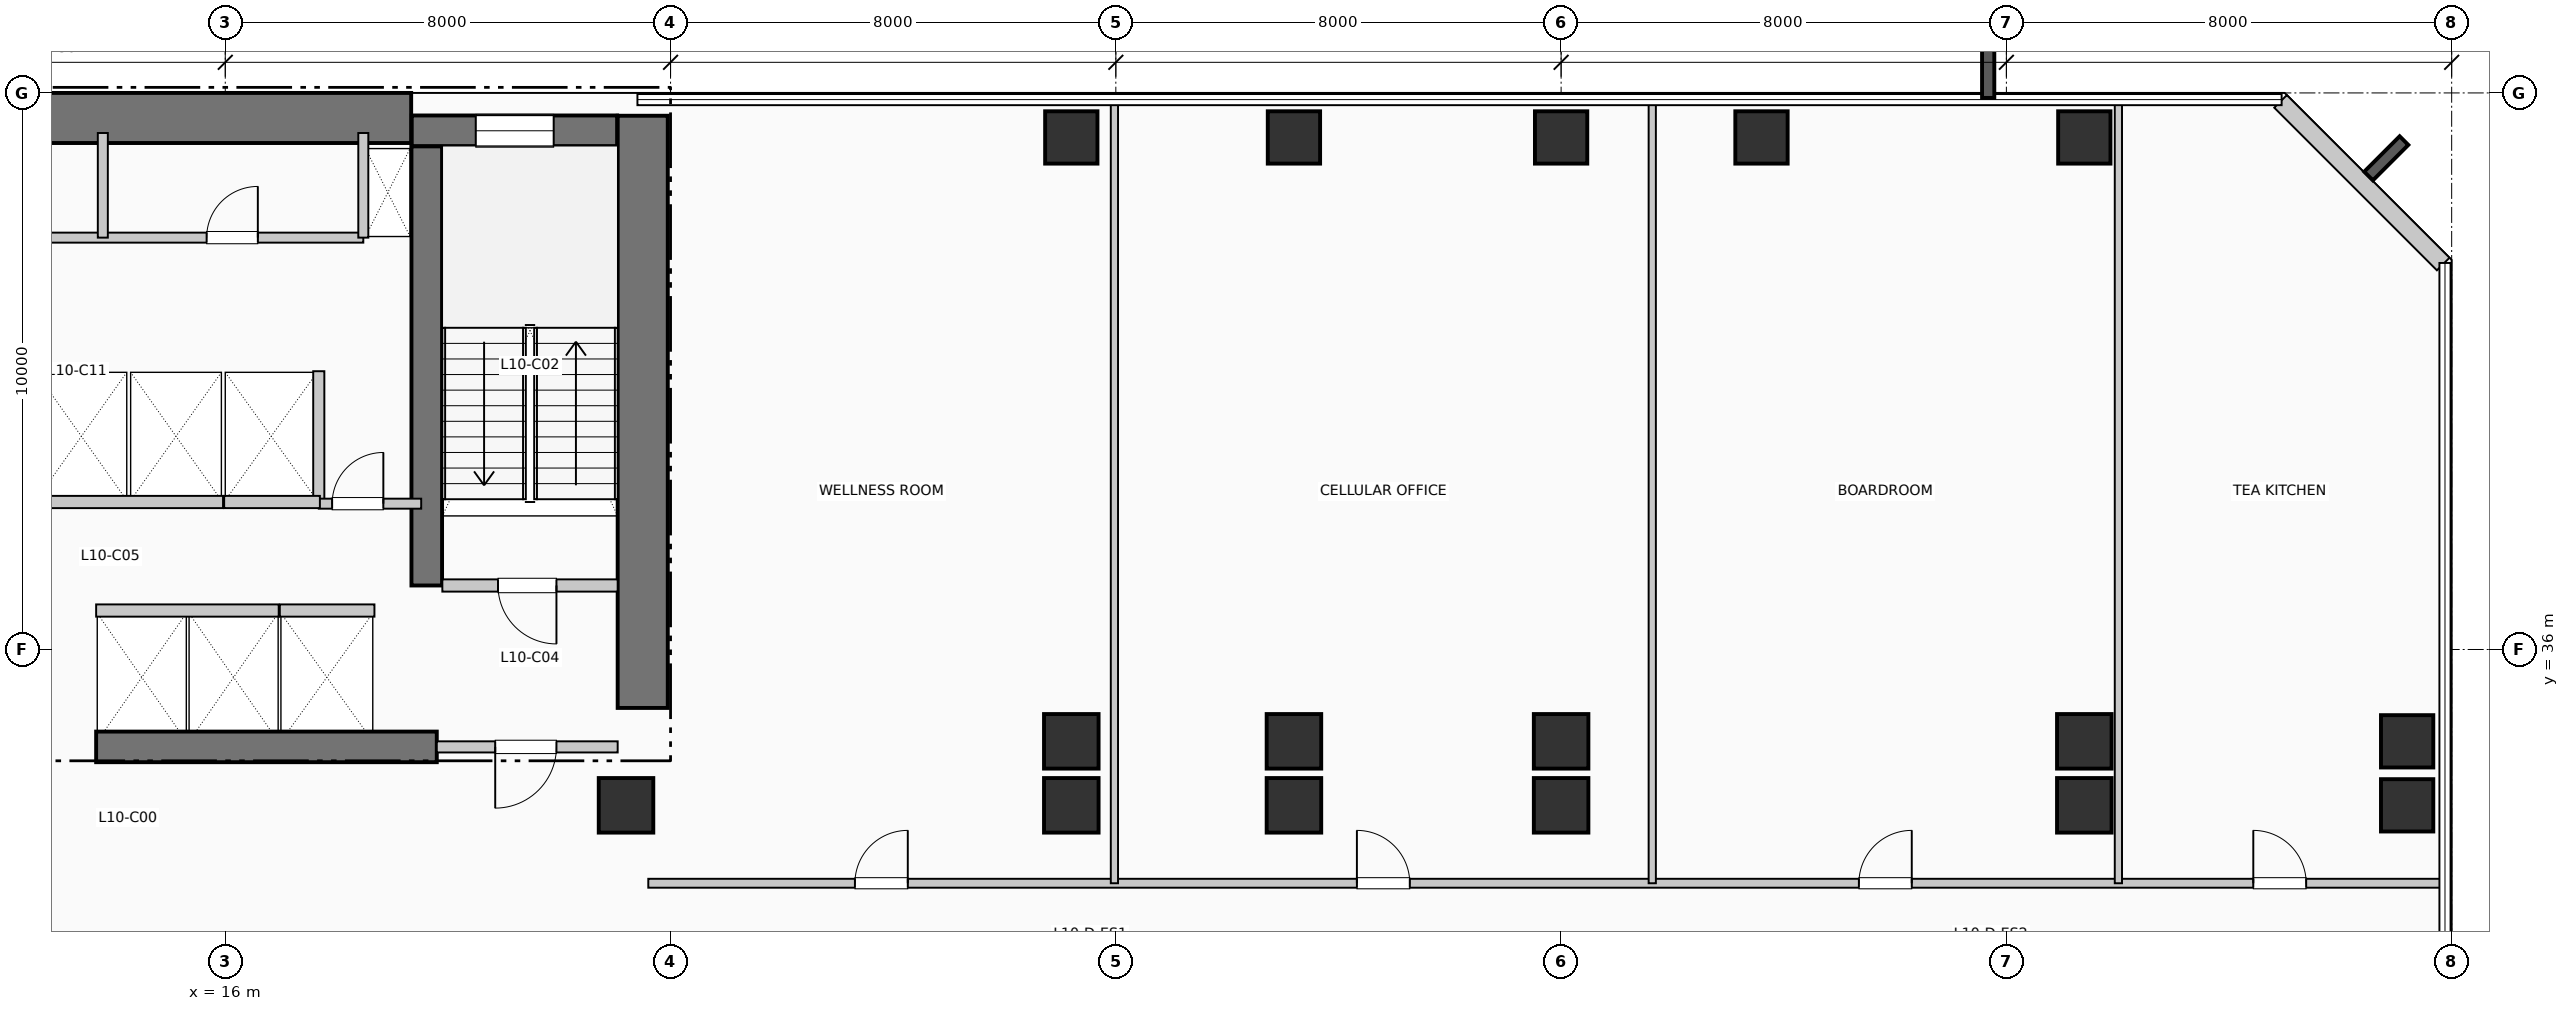
"""IFC4 building model, lengths in metres.
Left out: names, types, materials, properties, quantities, classifications, styles, units other than length and angle.
Written with IfcOpenShell. Run it as: python <this file> out.ifc"""

import sys

from ifc_helpers import new_model, si_unit, direction, frame, frame_2d, origin, origin_2d, place, context, subcontext, project, spatial, rectangle, extrude, element, fill, save


model = new_model("IFC4")
c1 = context("Model", 3, precision=1e-05, world=origin(), true_north=direction((0.0, 1.0)))
c2 = subcontext(c1, "Body", "Model", "MODEL_VIEW")
j1 = project(units=[si_unit("LENGTHUNIT", "METRE"), si_unit("PLANEANGLEUNIT", "RADIAN")], contexts=[c1])
p1 = place(None, origin())
s1 = spatial("IfcSite", under=j1, at=p1, CompositionType="ELEMENT")
p2 = place(p1, origin())
s2 = spatial("IfcBuilding", under=s1, at=p2, CompositionType="ELEMENT")
p3 = place(p2, frame((0.0, 0.0, 46.2)))
s3 = spatial("IfcBuildingStorey", under=s2, at=p3, CompositionType="ELEMENT", Elevation=46.2)
p4 = place(p3, frame((5.36, 45.55, 0.0), z_axis=(0.0, 0.0, 1.0), x_axis=(1.0, 0.0, 0.0)))
e1 = element("IfcWall", 1, at=p4, inside=s3, PredefinedType="SHEAR", context=c2, shape_type="SweptSolid", body=[
    extrude(rectangle(XDim=13.98, YDim=0.9, at=frame_2d((6.99, 0.0))), origin(), (0.0, 0.0, 1.0), 3.96),
])
p5 = place(p3, frame((23.5, 34.95, 0.0), z_axis=(0.0, 0.0, 1.0), x_axis=(0.0, 1.0, 0.0)))
e2 = element("IfcWall", 2, at=p5, inside=s3, PredefinedType="SHEAR", context=c2, shape_type="SweptSolid", body=[
    extrude(rectangle(XDim=10.64, YDim=0.9, at=frame_2d((5.32, 0.0))), origin(), (0.0, 0.0, 1.0), 3.96),
])
p6 = place(p3, frame((13.68, 34.25, 0.0), z_axis=(0.0, 0.0, 1.0), x_axis=(1.0, 0.0, 0.0)))
e3 = element("IfcWall", 3, at=p6, inside=s3, PredefinedType="SHEAR", context=c2, shape_type="SweptSolid", body=[
    extrude(rectangle(XDim=6.12, YDim=0.55, at=frame_2d((3.06, 0.0))), origin(), (0.0, 0.0, 1.0), 3.96),
])
p7 = place(p3, frame((19.62, 37.15, 0.0), z_axis=(0.0, 0.0, 1.0), x_axis=(0.0, 1.0, 0.0)))
e4 = element("IfcWall", 4, at=p7, inside=s3, PredefinedType="SHEAR", context=c2, shape_type="SweptSolid", body=[
    extrude(rectangle(XDim=7.89, YDim=0.55, at=frame_2d((3.945, 0.0))), origin(), (0.0, 0.0, 1.0), 3.96),
])
p8 = place(p3, frame((19.35, 45.32, 0.0), z_axis=(0.0, 0.0, 1.0), x_axis=(1.0, 0.0, 0.0)))
e5 = element("IfcWall", 5, at=p8, inside=s3, PredefinedType="SHEAR", context=c2, shape_type="SweptSolid", body=[
    extrude(rectangle(XDim=3.69, YDim=0.55, at=frame_2d((1.845, 0.0))), origin(), (0.0, 0.0, 1.0), 3.96),
])
p9 = place(p8, frame((1.15, 0.0, 1.05)))
e6 = element("IfcOpeningElement", 6, at=p9, cuts=e5, PredefinedType="OPENING", context=c2, shape_type="SweptSolid", body=[
    extrude(rectangle(XDim=1.4, YDim=1.8, at=frame_2d((0.7, 0.9))), frame((0.0, 0.285, 0.0), z_axis=(0.0, -1.0, 0.0), x_axis=(1.0, 0.0, 0.0)), (0.0, 0.0, 1.0), 0.57),
])
for number, where, z_axis, x_axis in (
    (7, (23.2, 33.2, 0.0), (0.0, 0.0, 1.0), (1.0, 0.0, 0.0)),
    (8, (31.2, 33.2, 0.0), (0.0, 0.0, 1.0), (1.0, 0.0, 0.0)),
    (9, (31.2, 34.35, 0.0), (0.0, 0.0, 1.0), (1.0, 0.0, 0.0)),
):
    element("IfcColumn", number, at=place(p3, frame(where, z_axis=z_axis, x_axis=x_axis)), inside=s3, PredefinedType="COLUMN", context=c2, shape_type="SweptSolid", body=[
        extrude(rectangle(XDim=0.98, YDim=0.98, at=origin_2d()), origin(), (0.0, 0.0, 1.0), 3.96),
    ])
p10 = place(p3, frame((31.2, 45.2, 0.0), z_axis=(0.0, 0.0, 1.0), x_axis=(1.0, 0.0, 0.0)))
e10 = element("IfcColumn", 10, at=p10, inside=s3, PredefinedType="COLUMN", context=c2, shape_type="SweptSolid", body=[
    extrude(rectangle(XDim=0.94, YDim=0.94, at=origin_2d()), origin(), (0.0, 0.0, 1.0), 3.96),
])
for number, where, z_axis, x_axis in (
    (11, (35.2, 33.2, 0.0), (0.0, 0.0, 1.0), (1.0, 0.0, 0.0)),
    (12, (35.2, 34.35, 0.0), (0.0, 0.0, 1.0), (1.0, 0.0, 0.0)),
):
    element("IfcColumn", number, at=place(p3, frame(where, z_axis=z_axis, x_axis=x_axis)), inside=s3, PredefinedType="COLUMN", context=c2, shape_type="SweptSolid", body=[
        extrude(rectangle(XDim=0.98, YDim=0.98, at=origin_2d()), origin(), (0.0, 0.0, 1.0), 3.96),
    ])
p11 = place(p3, frame((35.2, 45.2, 0.0), z_axis=(0.0, 0.0, 1.0), x_axis=(1.0, 0.0, 0.0)))
e13 = element("IfcColumn", 13, at=p11, inside=s3, PredefinedType="COLUMN", context=c2, shape_type="SweptSolid", body=[
    extrude(rectangle(XDim=0.94, YDim=0.94, at=origin_2d()), origin(), (0.0, 0.0, 1.0), 3.96),
])
for number, where, z_axis, x_axis in (
    (14, (40.0, 33.2, 0.0), (0.0, 0.0, 1.0), (1.0, 0.0, 0.0)),
    (15, (40.0, 34.35, 0.0), (0.0, 0.0, 1.0), (1.0, 0.0, 0.0)),
):
    element("IfcColumn", number, at=place(p3, frame(where, z_axis=z_axis, x_axis=x_axis)), inside=s3, PredefinedType="COLUMN", context=c2, shape_type="SweptSolid", body=[
        extrude(rectangle(XDim=0.98, YDim=0.98, at=origin_2d()), origin(), (0.0, 0.0, 1.0), 3.96),
    ])
for number, where, z_axis, x_axis in (
    (16, (40.0, 45.2, 0.0), (0.0, 0.0, 1.0), (1.0, 0.0, 0.0)),
    (17, (43.6, 45.2, 0.0), (0.0, 0.0, 1.0), (1.0, 0.0, 0.0)),
):
    element("IfcColumn", number, at=place(p3, frame(where, z_axis=z_axis, x_axis=x_axis)), inside=s3, PredefinedType="COLUMN", context=c2, shape_type="SweptSolid", body=[
        extrude(rectangle(XDim=0.94, YDim=0.94, at=origin_2d()), origin(), (0.0, 0.0, 1.0), 3.96),
    ])
for number, where, z_axis, x_axis in (
    (18, (49.4, 33.2, 0.0), (0.0, 0.0, 1.0), (1.0, 0.0, 0.0)),
    (19, (49.4, 34.35, 0.0), (0.0, 0.0, 1.0), (1.0, 0.0, 0.0)),
):
    element("IfcColumn", number, at=place(p3, frame(where, z_axis=z_axis, x_axis=x_axis)), inside=s3, PredefinedType="COLUMN", context=c2, shape_type="SweptSolid", body=[
        extrude(rectangle(XDim=0.98, YDim=0.98, at=origin_2d()), origin(), (0.0, 0.0, 1.0), 3.96),
    ])
for number, where, z_axis, x_axis in (
    (20, (49.4, 45.2, 0.0), (0.0, 0.0, 1.0), (1.0, 0.0, 0.0)),
    (21, (55.2, 33.2, 0.0), (0.0, 0.0, 1.0), (1.0, 0.0, 0.0)),
    (22, (55.2, 34.35, 0.0), (0.0, 0.0, 1.0), (1.0, 0.0, 0.0)),
):
    element("IfcColumn", number, at=place(p3, frame(where, z_axis=z_axis, x_axis=x_axis)), inside=s3, PredefinedType="COLUMN", context=c2, shape_type="SweptSolid", body=[
        extrude(rectangle(XDim=0.94, YDim=0.94, at=origin_2d()), origin(), (0.0, 0.0, 1.0), 3.96),
    ])
p12 = place(p3, frame((55.848, 42.926, 0.0), z_axis=(0.0, 0.0, 1.0), x_axis=(-0.707106781187, 0.707106781187, 0.0)))
e23 = element("IfcWall", 23, at=p12, inside=s3, PredefinedType="SOLIDWALL", context=c2, shape_type="SweptSolid", body=[
    extrude(rectangle(XDim=4.133, YDim=0.32, at=frame_2d((2.066, 0.0))), origin(), (0.0, 0.0, 1.0), 3.71),
])
p13 = place(p3, frame((19.9, 37.15, 0.0), z_axis=(0.0, 0.0, 1.0), x_axis=(1.0, 0.0, 0.0)))
e24 = element("IfcWall", 24, at=p13, inside=s3, PredefinedType="PARTITIONING", context=c2, shape_type="SweptSolid", body=[
    extrude(rectangle(XDim=3.15, YDim=0.22, at=frame_2d((1.575, 0.0))), origin(), (0.0, 0.0, 1.0), 3.71),
])
p14 = place(p13, frame((2.05, 0.0, 0.0), z_axis=(0.0, 0.0, 1.0), x_axis=(-1.0, 0.0, 0.0)))
e25 = element("IfcOpeningElement", 25, at=p14, cuts=e24, PredefinedType="OPENING", context=c2, shape_type="SweptSolid", body=[
    extrude(rectangle(XDim=1.05, YDim=2.15, at=frame_2d((0.525, 1.075))), frame((0.0, 0.12, 0.0), z_axis=(0.0, -1.0, 0.0), x_axis=(1.0, 0.0, 0.0)), (0.0, 0.0, 1.0), 0.24),
])
p15 = place(p3, frame((19.8, 34.25, 0.0), z_axis=(0.0, 0.0, 1.0), x_axis=(1.0, 0.0, 0.0)))
e26 = element("IfcWall", 26, at=p15, inside=s3, PredefinedType="PARTITIONING", context=c2, shape_type="SweptSolid", body=[
    extrude(rectangle(XDim=3.25, YDim=0.2, at=frame_2d((1.625, 0.0))), origin(), (0.0, 0.0, 1.0), 3.71),
])
p16 = place(p15, frame((2.15, 0.0, 0.0), z_axis=(0.0, 0.0, 1.0), x_axis=(-1.0, 0.0, 0.0)))
e27 = element("IfcOpeningElement", 27, at=p16, cuts=e26, PredefinedType="OPENING", context=c2, shape_type="SweptSolid", body=[
    extrude(rectangle(XDim=1.1, YDim=2.15, at=frame_2d((0.55, 1.075))), frame((0.0, 0.11, 0.0), z_axis=(0.0, -1.0, 0.0), x_axis=(1.0, 0.0, 0.0)), (0.0, 0.0, 1.0), 0.22),
])
p17 = place(p3, frame((17.68, 38.65, 0.0), z_axis=(0.0, 0.0, 1.0), x_axis=(0.0, 1.0, 0.0)))
e28 = element("IfcWall", 28, at=p17, inside=s3, PredefinedType="PARTITIONING", context=c2, shape_type="SweptSolid", body=[
    extrude(rectangle(XDim=2.35, YDim=0.2, at=frame_2d((1.175, 0.0))), origin(), (0.0, 0.0, 1.0), 3.71),
])
p18 = place(p3, frame((17.68, 38.62, 0.0), z_axis=(0.0, 0.0, 1.0), x_axis=(1.0, 0.0, 0.0)))
e29 = element("IfcWall", 29, at=p18, inside=s3, PredefinedType="PARTITIONING", context=c2, shape_type="SweptSolid", body=[
    extrude(rectangle(XDim=1.84, YDim=0.18, at=frame_2d((0.92, 0.0))), origin(), (0.0, 0.0, 1.0), 3.71),
])
p19 = place(p18, frame((0.24, 0.0, 0.0)))
e30 = element("IfcOpeningElement", 30, at=p19, cuts=e29, PredefinedType="OPENING", context=c2, shape_type="SweptSolid", body=[
    extrude(rectangle(XDim=0.92, YDim=2.1, at=frame_2d((0.46, 1.05))), frame((0.0, 0.1, 0.0), z_axis=(0.0, -1.0, 0.0), x_axis=(1.0, 0.0, 0.0)), (0.0, 0.0, 1.0), 0.2),
])
p20 = place(p3, frame((13.68, 36.7, 0.0), z_axis=(0.0, 0.0, 1.0), x_axis=(1.0, 0.0, 0.0)))
e31 = element("IfcWall", 31, at=p20, inside=s3, PredefinedType="PARTITIONING", context=c2, shape_type="SweptSolid", body=[
    extrude(rectangle(XDim=3.28, YDim=0.22, at=frame_2d((1.64, 0.0))), origin(), (0.0, 0.0, 1.0), 3.71),
])
p21 = place(p3, frame((12.58, 38.65, 0.0), z_axis=(0.0, 0.0, 1.0), x_axis=(1.0, 0.0, 0.0)))
e32 = element("IfcWall", 32, at=p21, inside=s3, PredefinedType="PARTITIONING", context=c2, shape_type="SweptSolid", body=[
    extrude(rectangle(XDim=3.38, YDim=0.22, at=frame_2d((1.69, 0.0))), origin(), (0.0, 0.0, 1.0), 3.71),
])
p22 = place(p3, frame((16.98, 36.7, 0.0), z_axis=(0.0, 0.0, 1.0), x_axis=(1.0, 0.0, 0.0)))
e33 = element("IfcWall", 33, at=p22, inside=s3, PredefinedType="PARTITIONING", context=c2, shape_type="SweptSolid", body=[
    extrude(rectangle(XDim=1.7, YDim=0.22, at=frame_2d((0.85, 0.0))), origin(), (0.0, 0.0, 1.0), 3.71),
])
p23 = place(p3, frame((15.98, 38.65, 0.0), z_axis=(0.0, 0.0, 1.0), x_axis=(1.0, 0.0, 0.0)))
e34 = element("IfcWall", 34, at=p23, inside=s3, PredefinedType="PARTITIONING", context=c2, shape_type="SweptSolid", body=[
    extrude(rectangle(XDim=1.72, YDim=0.22, at=frame_2d((0.86, 0.0))), origin(), (0.0, 0.0, 1.0), 3.71),
])
p24 = place(p3, frame((9.15, 43.4, 0.0), z_axis=(0.0, 0.0, 1.0), x_axis=(1.0, 0.0, 0.0)))
e35 = element("IfcWall", 35, at=p24, inside=s3, PredefinedType="PLUMBINGWALL", context=c2, shape_type="SweptSolid", body=[
    extrude(rectangle(XDim=9.33, YDim=0.18, at=frame_2d((4.665, 0.0))), origin(), (0.0, 0.0, 1.0), 3.71),
])
p25 = place(p24, frame((1.88, 0.0, 0.0)))
e36 = element("IfcOpeningElement", 36, at=p25, cuts=e35, PredefinedType="OPENING", context=c2, shape_type="SweptSolid", body=[
    extrude(rectangle(XDim=0.92, YDim=2.1, at=frame_2d((0.46, 1.05))), frame((0.0, 0.1, 0.0), z_axis=(0.0, -1.0, 0.0), x_axis=(1.0, 0.0, 0.0)), (0.0, 0.0, 1.0), 0.2),
])
p26 = place(p24, frame((6.515, 0.0, 0.0)))
e37 = element("IfcOpeningElement", 37, at=p26, cuts=e35, PredefinedType="OPENING", context=c2, shape_type="SweptSolid", body=[
    extrude(rectangle(XDim=0.92, YDim=2.1, at=frame_2d((0.46, 1.05))), frame((0.0, 0.1, 0.0), z_axis=(0.0, -1.0, 0.0), x_axis=(1.0, 0.0, 0.0)), (0.0, 0.0, 1.0), 0.2),
])
for number, where, z_axis, x_axis in (
    (38, (18.48, 43.4, 0.0), (0.0, 0.0, 1.0), (0.0, 1.0, 0.0)),
    (39, (13.8, 43.4, 0.0), (0.0, 0.0, 1.0), (0.0, 1.0, 0.0)),
):
    element("IfcWall", number, at=place(p3, frame(where, z_axis=z_axis, x_axis=x_axis)), inside=s3, PredefinedType="PLUMBINGWALL", context=c2, shape_type="SweptSolid", body=[
        extrude(rectangle(XDim=1.88, YDim=0.18, at=frame_2d((0.94, 0.0))), origin(), (0.0, 0.0, 1.0), 3.71),
    ])
p27 = place(p3, frame((23.6, 31.8, 0.0), z_axis=(0.0, 0.0, 1.0), x_axis=(1.0, 0.0, 0.0)))
e40 = element("IfcWall", 40, at=p27, inside=s3, PredefinedType="PARTITIONING", context=c2, shape_type="SweptSolid", body=[
    extrude(rectangle(XDim=32.21, YDim=0.16, at=frame_2d((16.105, 0.0))), origin(), (0.0, 0.0, 1.0), 3.71),
])
p28 = place(p27, frame((3.712, 0.0, 0.0)))
e41 = element("IfcOpeningElement", 41, at=p28, cuts=e40, PredefinedType="OPENING", context=c2, shape_type="SweptSolid", body=[
    extrude(rectangle(XDim=0.95, YDim=2.15, at=frame_2d((0.475, 1.075))), frame((0.0, 0.09, 0.0), z_axis=(0.0, -1.0, 0.0), x_axis=(1.0, 0.0, 0.0)), (0.0, 0.0, 1.0), 0.18),
])
p29 = place(p27, frame((12.731, 0.0, 0.0)))
e42 = element("IfcOpeningElement", 42, at=p29, cuts=e40, PredefinedType="OPENING", context=c2, shape_type="SweptSolid", body=[
    extrude(rectangle(XDim=0.95, YDim=2.15, at=frame_2d((0.475, 1.075))), frame((0.0, 0.09, 0.0), z_axis=(0.0, -1.0, 0.0), x_axis=(1.0, 0.0, 0.0)), (0.0, 0.0, 1.0), 0.18),
])
p30 = place(p27, frame((21.75, 0.0, 0.0)))
e43 = element("IfcOpeningElement", 43, at=p30, cuts=e40, PredefinedType="OPENING", context=c2, shape_type="SweptSolid", body=[
    extrude(rectangle(XDim=0.95, YDim=2.15, at=frame_2d((0.475, 1.075))), frame((0.0, 0.09, 0.0), z_axis=(0.0, -1.0, 0.0), x_axis=(1.0, 0.0, 0.0)), (0.0, 0.0, 1.0), 0.18),
])
p31 = place(p27, frame((28.836, 0.0, 0.0)))
e44 = element("IfcOpeningElement", 44, at=p31, cuts=e40, PredefinedType="OPENING", context=c2, shape_type="SweptSolid", body=[
    extrude(rectangle(XDim=0.95, YDim=2.15, at=frame_2d((0.475, 1.075))), frame((0.0, 0.09, 0.0), z_axis=(0.0, -1.0, 0.0), x_axis=(1.0, 0.0, 0.0)), (0.0, 0.0, 1.0), 0.18),
])
for number, where, z_axis, x_axis in (
    (45, (31.975, 31.8, 0.0), (0.0, 0.0, 1.0), (0.0, 1.0, 0.0)),
    (46, (41.638, 31.8, 0.0), (0.0, 0.0, 1.0), (0.0, 1.0, 0.0)),
    (47, (50.012, 31.8, 0.0), (0.0, 0.0, 1.0), (0.0, 1.0, 0.0)),
):
    element("IfcWall", number, at=place(p3, frame(where, z_axis=z_axis, x_axis=x_axis)), inside=s3, PredefinedType="PARTITIONING", context=c2, shape_type="SweptSolid", body=[
        extrude(rectangle(XDim=14.01, YDim=0.13, at=frame_2d((7.005, 0.0))), origin(), (0.0, 0.0, 1.0), 3.71),
    ])
p32 = place(p9, origin())
e48 = element("IfcWindow", 48, at=p32, inside=s3, PartitioningType="SINGLE_PANEL", PredefinedType="WINDOW", context=c2, shape_type="SweptSolid", body=[
    extrude(rectangle(XDim=1.4, YDim=1.8, at=frame_2d((0.7, 0.9))), frame((0.0, 0.03, 0.0), z_axis=(0.0, -1.0, 0.0), x_axis=(1.0, 0.0, 0.0)), (0.0, 0.0, 1.0), 0.06),
])
fill(e6, e48)
p33 = place(p14, origin())
e49 = element("IfcDoor", 49, at=p33, inside=s3, OperationType="SINGLE_SWING_RIGHT", PredefinedType="DOOR", context=c2, shape_type="SweptSolid", body=[
    extrude(rectangle(XDim=1.05, YDim=2.15, at=frame_2d((0.525, 1.075))), frame((0.0, 0.025, 0.0), z_axis=(0.0, -1.0, 0.0), x_axis=(1.0, 0.0, 0.0)), (0.0, 0.0, 1.0), 0.05),
])
fill(e25, e49)
p34 = place(p16, origin())
e50 = element("IfcDoor", 50, at=p34, inside=s3, OperationType="SINGLE_SWING_LEFT", PredefinedType="DOOR", context=c2, shape_type="SweptSolid", body=[
    extrude(rectangle(XDim=1.1, YDim=2.15, at=frame_2d((0.55, 1.075))), frame((0.0, 0.025, 0.0), z_axis=(0.0, -1.0, 0.0), x_axis=(1.0, 0.0, 0.0)), (0.0, 0.0, 1.0), 0.05),
])
fill(e27, e50)
p35 = place(p19, origin())
e51 = element("IfcDoor", 51, at=p35, inside=s3, OperationType="SINGLE_SWING_RIGHT", PredefinedType="DOOR", context=c2, shape_type="SweptSolid", body=[
    extrude(rectangle(XDim=0.92, YDim=2.1, at=frame_2d((0.46, 1.05))), frame((0.0, 0.025, 0.0), z_axis=(0.0, -1.0, 0.0), x_axis=(1.0, 0.0, 0.0)), (0.0, 0.0, 1.0), 0.05),
])
fill(e30, e51)
p36 = place(p26, origin())
e52 = element("IfcDoor", 52, at=p36, inside=s3, OperationType="SINGLE_SWING_RIGHT", PredefinedType="DOOR", context=c2, shape_type="SweptSolid", body=[
    extrude(rectangle(XDim=0.92, YDim=2.1, at=frame_2d((0.46, 1.05))), frame((0.0, 0.025, 0.0), z_axis=(0.0, -1.0, 0.0), x_axis=(1.0, 0.0, 0.0)), (0.0, 0.0, 1.0), 0.05),
])
fill(e37, e52)
p37 = place(p28, origin())
e53 = element("IfcDoor", 53, at=p37, inside=s3, OperationType="SINGLE_SWING_RIGHT", PredefinedType="DOOR", context=c2, shape_type="SweptSolid", body=[
    extrude(rectangle(XDim=0.95, YDim=2.15, at=frame_2d((0.475, 1.075))), frame((0.0, 0.025, 0.0), z_axis=(0.0, -1.0, 0.0), x_axis=(1.0, 0.0, 0.0)), (0.0, 0.0, 1.0), 0.05),
])
fill(e41, e53)
p38 = place(p29, origin())
e54 = element("IfcDoor", 54, at=p38, inside=s3, OperationType="SINGLE_SWING_LEFT", PredefinedType="DOOR", context=c2, shape_type="SweptSolid", body=[
    extrude(rectangle(XDim=0.95, YDim=2.15, at=frame_2d((0.475, 1.075))), frame((0.0, 0.025, 0.0), z_axis=(0.0, -1.0, 0.0), x_axis=(1.0, 0.0, 0.0)), (0.0, 0.0, 1.0), 0.05),
])
fill(e42, e54)
p39 = place(p30, origin())
e55 = element("IfcDoor", 55, at=p39, inside=s3, OperationType="SINGLE_SWING_RIGHT", PredefinedType="DOOR", context=c2, shape_type="SweptSolid", body=[
    extrude(rectangle(XDim=0.95, YDim=2.15, at=frame_2d((0.475, 1.075))), frame((0.0, 0.025, 0.0), z_axis=(0.0, -1.0, 0.0), x_axis=(1.0, 0.0, 0.0)), (0.0, 0.0, 1.0), 0.05),
])
fill(e43, e55)
p40 = place(p31, origin())
e56 = element("IfcDoor", 56, at=p40, inside=s3, OperationType="SINGLE_SWING_LEFT", PredefinedType="DOOR", context=c2, shape_type="SweptSolid", body=[
    extrude(rectangle(XDim=0.95, YDim=2.15, at=frame_2d((0.475, 1.075))), frame((0.0, 0.025, 0.0), z_axis=(0.0, -1.0, 0.0), x_axis=(1.0, 0.0, 0.0)), (0.0, 0.0, 1.0), 0.05),
])
fill(e44, e56)
save(model, sys.argv[1])
